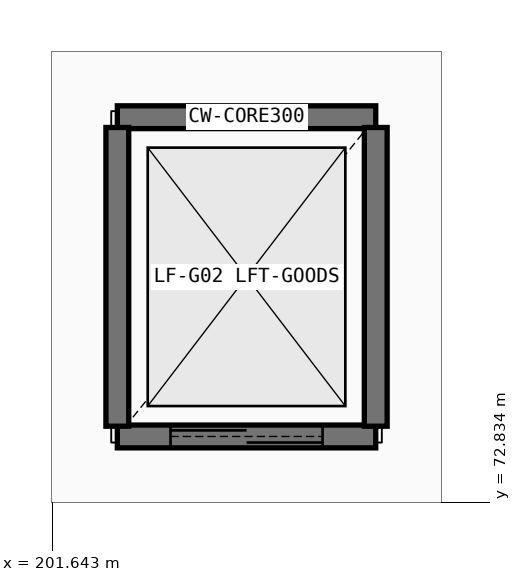
"""IFC4 building model, lengths in metres.
Left out: names, types, materials, properties, quantities, classifications, styles, units other than length and angle.
Written with IfcOpenShell. Run it as: python <this file> out.ifc"""

import sys

from ifc_helpers import new_model, si_unit, direction, frame, frame_2d, origin, place, context, subcontext, project, spatial, rectangle, extrude, element, fill, save


model = new_model("IFC4")
c1 = context("Model", 3, precision=1e-05, world=origin(), true_north=direction((0.0, 1.0)))
c2 = subcontext(c1, "Body", "Model", "MODEL_VIEW")
j1 = project(units=[si_unit("LENGTHUNIT", "METRE"), si_unit("PLANEANGLEUNIT", "RADIAN")], contexts=[c1])
p1 = place(None, origin())
s1 = spatial("IfcSite", under=j1, at=p1, CompositionType="ELEMENT")
p2 = place(p1, origin())
s2 = spatial("IfcBuilding", under=s1, at=p2, CompositionType="ELEMENT")
p3 = place(p2, frame((0.0, 0.0, 11.4)))
s3 = spatial("IfcBuildingStorey", under=s2, at=p3, CompositionType="ELEMENT", Elevation=11.4)
p4 = place(p3, frame((205.9, 77.9, 0.0), z_axis=(0.0, 0.0, 1.0), x_axis=(-1.0, 0.0, 0.0)))
e1 = element("IfcWall", 1, at=p4, inside=s3, PredefinedType="SHEAR", context=c2, shape_type="SweptSolid", body=[
    extrude(rectangle(XDim=3.4, YDim=0.3, at=frame_2d((1.7, 0.0))), origin(), (0.0, 0.0, 1.0), 4.27),
])
p5 = place(p3, frame((202.5, 73.7, 0.0), z_axis=(0.0, 0.0, 1.0), x_axis=(1.0, 0.0, 0.0)))
e2 = element("IfcWall", 2, at=p5, inside=s3, PredefinedType="SHEAR", context=c2, shape_type="SweptSolid", body=[
    extrude(rectangle(XDim=3.4, YDim=0.3, at=frame_2d((1.7, 0.0))), origin(), (0.0, 0.0, 1.0), 4.27),
])
p6 = place(p5, frame((0.7, 0.0, 0.0)))
e3 = element("IfcOpeningElement", 3, at=p6, cuts=e2, PredefinedType="OPENING", context=c2, shape_type="SweptSolid", body=[
    extrude(rectangle(XDim=2.0, YDim=2.5, at=frame_2d((1.0, 1.25))), frame((0.0, 0.16, 0.0), z_axis=(0.0, -1.0, 0.0), x_axis=(1.0, 0.0, 0.0)), (0.0, 0.0, 1.0), 0.32),
])
for number, where, z_axis, x_axis in (
    (4, (205.9, 73.835, 0.0), (0.0, 0.0, 1.0), (0.0, 1.0, 0.0)),
    (5, (202.5, 77.765, 0.0), (0.0, 0.0, 1.0), (0.0, -1.0, 0.0)),
):
    element("IfcWall", number, at=place(p3, frame(where, z_axis=z_axis, x_axis=x_axis)), inside=s3, PredefinedType="SHEAR", context=c2, shape_type="SweptSolid", body=[
        extrude(rectangle(XDim=3.93, YDim=0.3, at=frame_2d((1.965, 0.0))), origin(), (0.0, 0.0, 1.0), 4.27),
    ])
p7 = place(p6, origin())
e6 = element("IfcDoor", 6, at=p7, inside=s3, OperationType="DOUBLE_DOOR_SLIDING", PredefinedType="DOOR", context=c2, shape_type="SweptSolid", body=[
    extrude(rectangle(XDim=2.0, YDim=2.5, at=frame_2d((1.0, 1.25))), frame((0.0, 0.025, 0.0), z_axis=(0.0, -1.0, 0.0), x_axis=(1.0, 0.0, 0.0)), (0.0, 0.0, 1.0), 0.05),
])
fill(e3, e6)
save(model, sys.argv[1])
